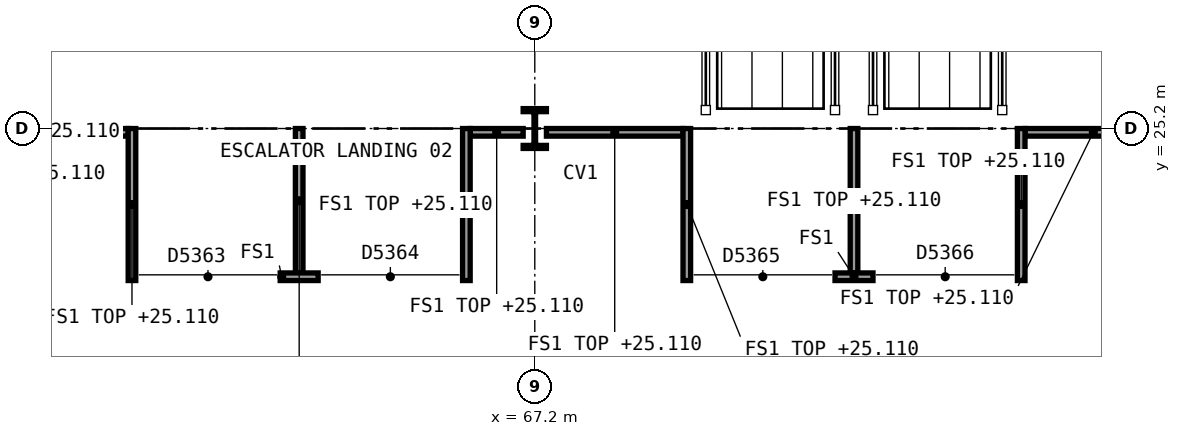
"""IFC4 building model, lengths in metres.
Left out: names, types, materials, properties, quantities, classifications, styles, units other than length and angle.
Written with IfcOpenShell. Run it as: python <this file> out.ifc"""

import sys

from ifc_helpers import new_model, si_unit, direction, frame, frame_2d, origin, origin_2d, place, context, subcontext, project, spatial, rectangle, i_section, extrude, element, fill, save


model = new_model("IFC4")
c1 = context("Model", 3, precision=1e-05, world=origin(), true_north=direction((0.0, 1.0)))
c2 = subcontext(c1, "Body", "Model", "MODEL_VIEW")
j1 = project(units=[si_unit("LENGTHUNIT", "METRE"), si_unit("PLANEANGLEUNIT", "RADIAN")], contexts=[c1])
p1 = place(None, origin())
s1 = spatial("IfcSite", under=j1, at=p1, CompositionType="ELEMENT")
p2 = place(p1, origin())
s2 = spatial("IfcBuilding", under=s1, at=p2, CompositionType="ELEMENT")
p3 = place(p2, frame((0.0, 0.0, 21.0)))
s3 = spatial("IfcBuildingStorey", under=s2, at=p3, CompositionType="ELEMENT", Elevation=21.0)
p4 = place(p3, frame((67.2, 25.2, 0.0), z_axis=(0.0, 0.0, 1.0), x_axis=(1.0, 0.0, 0.0)))
e1 = element("IfcColumn", 1, at=p4, inside=s3, PredefinedType="COLUMN", context=c2, shape_type="SweptSolid", body=[
    extrude(i_section(OverallWidth=0.306, OverallDepth=0.524, WebThickness=0.021, FlangeThickness=0.04, FilletRadius=0.027, at=origin_2d()), origin(), (0.0, 0.0, 1.0), 4.8),
])
p5 = place(p3, frame((58.953, 25.15, 0.0), z_axis=(0.0, 0.0, 1.0), x_axis=(1.0, 0.0, 0.0)))
e2 = element("IfcWall", 2, at=p5, inside=s3, PredefinedType="PARTITIONING", context=c2, shape_type="SweptSolid", body=[
    extrude(rectangle(XDim=2.897, YDim=0.1, at=frame_2d((1.449, 0.0))), origin(), (0.0, 0.0, 1.0), 4.11),
])
p6 = place(p3, frame((66.35, 25.15, 0.0), z_axis=(0.0, 0.0, 1.0), x_axis=(1.0, 0.0, 0.0)))
e3 = element("IfcWall", 3, at=p6, inside=s3, PredefinedType="PARTITIONING", context=c2, shape_type="SweptSolid", body=[
    extrude(rectangle(XDim=0.697, YDim=0.1, at=frame_2d((0.349, 0.0))), origin(), (0.0, 0.0, 1.0), 4.11),
])
p7 = place(p3, frame((67.353, 25.15, 0.0), z_axis=(0.0, 0.0, 1.0), x_axis=(1.0, 0.0, 0.0)))
e4 = element("IfcWall", 4, at=p7, inside=s3, PredefinedType="PARTITIONING", context=c2, shape_type="SweptSolid", body=[
    extrude(rectangle(XDim=1.797, YDim=0.1, at=frame_2d((0.898, 0.0))), origin(), (0.0, 0.0, 1.0), 4.11),
])
p8 = place(p3, frame((73.65, 25.15, 0.0), z_axis=(0.0, 0.0, 1.0), x_axis=(1.0, 0.0, 0.0)))
e5 = element("IfcWall", 5, at=p8, inside=s3, PredefinedType="PARTITIONING", context=c2, shape_type="SweptSolid", body=[
    extrude(rectangle(XDim=1.798, YDim=0.1, at=frame_2d((0.899, 0.0))), origin(), (0.0, 0.0, 1.0), 4.11),
])
p9 = place(p3, frame((61.9, 25.2, 0.0), z_axis=(0.0, 0.0, 1.0), x_axis=(0.0, -1.0, 0.0)))
e6 = element("IfcWall", 6, at=p9, inside=s3, PredefinedType="PARTITIONING", context=c2, shape_type="SweptSolid", body=[
    extrude(rectangle(XDim=2.0, YDim=0.1, at=frame_2d((1.0, 0.0))), origin(), (0.0, 0.0, 1.0), 4.11),
])
p10 = place(p3, frame((64.1, 25.2, 0.0), z_axis=(0.0, 0.0, 1.0), x_axis=(0.0, -1.0, 0.0)))
e7 = element("IfcWall", 7, at=p10, inside=s3, PredefinedType="PARTITIONING", context=c2, shape_type="SweptSolid", body=[
    extrude(rectangle(XDim=1.9, YDim=0.1, at=frame_2d((0.95, 0.0))), origin(), (0.0, 0.0, 1.0), 4.11),
])
for number, where, z_axis, x_axis in (
    (8, (66.3, 25.2, 0.0), (0.0, 0.0, 1.0), (0.0, -1.0, 0.0)),
    (9, (69.2, 25.2, 0.0), (0.0, 0.0, 1.0), (0.0, -1.0, 0.0)),
):
    element("IfcWall", number, at=place(p3, frame(where, z_axis=z_axis, x_axis=x_axis)), inside=s3, PredefinedType="PARTITIONING", context=c2, shape_type="SweptSolid", body=[
        extrude(rectangle(XDim=2.0, YDim=0.1, at=frame_2d((1.0, 0.0))), origin(), (0.0, 0.0, 1.0), 4.11),
    ])
p11 = place(p3, frame((71.4, 25.2, 0.0), z_axis=(0.0, 0.0, 1.0), x_axis=(0.0, -1.0, 0.0)))
e10 = element("IfcWall", 10, at=p11, inside=s3, PredefinedType="PARTITIONING", context=c2, shape_type="SweptSolid", body=[
    extrude(rectangle(XDim=1.9, YDim=0.1, at=frame_2d((0.95, 0.0))), origin(), (0.0, 0.0, 1.0), 4.11),
])
p12 = place(p3, frame((73.6, 25.2, 0.0), z_axis=(0.0, 0.0, 1.0), x_axis=(0.0, -1.0, 0.0)))
e11 = element("IfcWall", 11, at=p12, inside=s3, PredefinedType="PARTITIONING", context=c2, shape_type="SweptSolid", body=[
    extrude(rectangle(XDim=2.0, YDim=0.1, at=frame_2d((1.0, 0.0))), origin(), (0.0, 0.0, 1.0), 4.11),
])
p13 = place(p3, frame((61.95, 23.25, 0.0), z_axis=(0.0, 0.0, 1.0), x_axis=(1.0, 0.0, 0.0)))
e12 = element("IfcWall", 12, at=p13, inside=s3, PredefinedType="PARTITIONING", context=c2, shape_type="SweptSolid", body=[
    extrude(rectangle(XDim=4.3, YDim=0.1, at=frame_2d((2.15, 0.0))), origin(), (0.0, 0.0, 1.0), 4.65),
])
p14 = place(p13, origin())
e13 = element("IfcOpeningElement", 13, at=p14, cuts=e12, PredefinedType="OPENING", context=c2, shape_type="SweptSolid", body=[
    extrude(rectangle(XDim=1.91, YDim=2.4, at=frame_2d((0.945, 1.2))), frame((0.0, 0.06, 0.0), z_axis=(0.0, -1.0, 0.0), x_axis=(1.0, 0.0, 0.0)), (0.0, 0.0, 1.0), 0.12),
])
p15 = place(p13, frame((2.4, 0.0, 0.0)))
e14 = element("IfcOpeningElement", 14, at=p15, cuts=e12, PredefinedType="OPENING", context=c2, shape_type="SweptSolid", body=[
    extrude(rectangle(XDim=1.91, YDim=2.4, at=frame_2d((0.955, 1.2))), frame((0.0, 0.06, 0.0), z_axis=(0.0, -1.0, 0.0), x_axis=(1.0, 0.0, 0.0)), (0.0, 0.0, 1.0), 0.12),
])
p16 = place(p3, frame((69.25, 23.25, 0.0), z_axis=(0.0, 0.0, 1.0), x_axis=(1.0, 0.0, 0.0)))
e15 = element("IfcWall", 15, at=p16, inside=s3, PredefinedType="PARTITIONING", context=c2, shape_type="SweptSolid", body=[
    extrude(rectangle(XDim=4.3, YDim=0.1, at=frame_2d((2.15, 0.0))), origin(), (0.0, 0.0, 1.0), 4.65),
])
p17 = place(p16, origin())
e16 = element("IfcOpeningElement", 16, at=p17, cuts=e15, PredefinedType="OPENING", context=c2, shape_type="SweptSolid", body=[
    extrude(rectangle(XDim=1.91, YDim=2.4, at=frame_2d((0.945, 1.2))), frame((0.0, 0.06, 0.0), z_axis=(0.0, -1.0, 0.0), x_axis=(1.0, 0.0, 0.0)), (0.0, 0.0, 1.0), 0.12),
])
p18 = place(p16, frame((2.4, 0.0, 0.0)))
e17 = element("IfcOpeningElement", 17, at=p18, cuts=e15, PredefinedType="OPENING", context=c2, shape_type="SweptSolid", body=[
    extrude(rectangle(XDim=1.91, YDim=2.4, at=frame_2d((0.955, 1.2))), frame((0.0, 0.06, 0.0), z_axis=(0.0, -1.0, 0.0), x_axis=(1.0, 0.0, 0.0)), (0.0, 0.0, 1.0), 0.12),
])
p19 = place(p14, frame((1.9, 0.0, 0.0), z_axis=(0.0, 0.0, 1.0), x_axis=(-1.0, 0.0, 0.0)))
e18 = element("IfcDoor", 18, at=p19, inside=s3, OperationType="DOUBLE_DOOR_SLIDING", PredefinedType="DOOR", context=c2, shape_type="SweptSolid", body=[
    extrude(rectangle(XDim=1.9, YDim=2.4, at=frame_2d((0.95, 1.2))), frame((0.0, 0.025, 0.0), z_axis=(0.0, -1.0, 0.0), x_axis=(1.0, 0.0, 0.0)), (0.0, 0.0, 1.0), 0.05),
])
fill(e13, e18)
p20 = place(p15, frame((1.9, 0.0, 0.0), z_axis=(0.0, 0.0, 1.0), x_axis=(-1.0, 0.0, 0.0)))
e19 = element("IfcDoor", 19, at=p20, inside=s3, OperationType="DOUBLE_DOOR_SLIDING", PredefinedType="DOOR", context=c2, shape_type="SweptSolid", body=[
    extrude(rectangle(XDim=1.9, YDim=2.4, at=frame_2d((0.95, 1.2))), frame((0.0, 0.025, 0.0), z_axis=(0.0, -1.0, 0.0), x_axis=(1.0, 0.0, 0.0)), (0.0, 0.0, 1.0), 0.05),
])
fill(e14, e19)
p21 = place(p17, frame((1.9, 0.0, 0.0), z_axis=(0.0, 0.0, 1.0), x_axis=(-1.0, 0.0, 0.0)))
e20 = element("IfcDoor", 20, at=p21, inside=s3, OperationType="DOUBLE_DOOR_SLIDING", PredefinedType="DOOR", context=c2, shape_type="SweptSolid", body=[
    extrude(rectangle(XDim=1.9, YDim=2.4, at=frame_2d((0.95, 1.2))), frame((0.0, 0.025, 0.0), z_axis=(0.0, -1.0, 0.0), x_axis=(1.0, 0.0, 0.0)), (0.0, 0.0, 1.0), 0.05),
])
fill(e16, e20)
p22 = place(p18, frame((1.9, 0.0, 0.0), z_axis=(0.0, 0.0, 1.0), x_axis=(-1.0, 0.0, 0.0)))
e21 = element("IfcDoor", 21, at=p22, inside=s3, OperationType="DOUBLE_DOOR_SLIDING", PredefinedType="DOOR", context=c2, shape_type="SweptSolid", body=[
    extrude(rectangle(XDim=1.9, YDim=2.4, at=frame_2d((0.95, 1.2))), frame((0.0, 0.025, 0.0), z_axis=(0.0, -1.0, 0.0), x_axis=(1.0, 0.0, 0.0)), (0.0, 0.0, 1.0), 0.05),
])
fill(e17, e21)
save(model, sys.argv[1])
